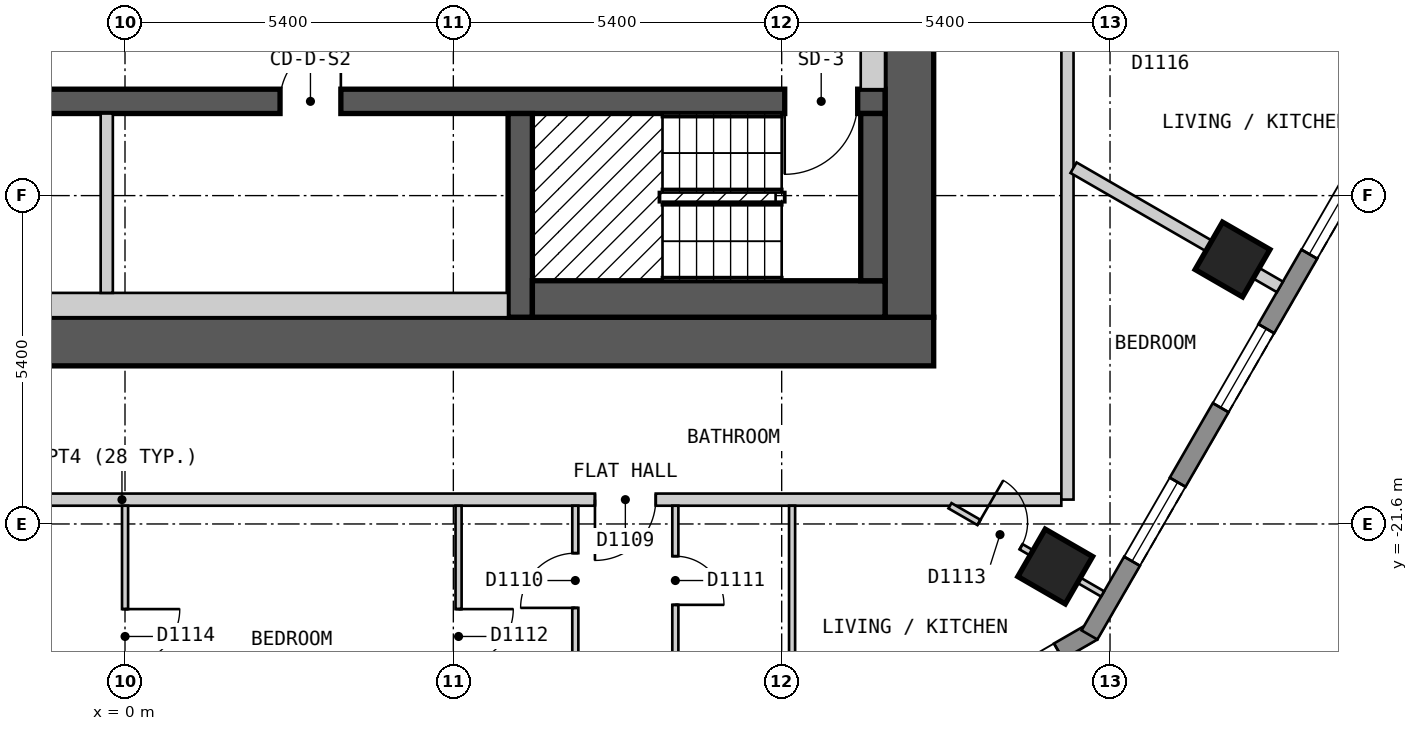
"""IFC4 building model, lengths in metres.
Left out: names, types, materials, properties, quantities, classifications, styles, units other than length and angle.
Written with IfcOpenShell. Run it as: python <this file> out.ifc"""

import sys

from ifc_helpers import new_model, si_unit, direction, frame, frame_2d, origin, origin_2d, place, context, subcontext, project, spatial, polyline, rectangle, outline, extrude, element, fill, save


model = new_model("IFC4")
c1 = context("Model", 3, precision=1e-05, world=origin(), true_north=direction((0.0, 1.0)))
c2 = subcontext(c1, "Body", "Model", "MODEL_VIEW")
j1 = project(units=[si_unit("LENGTHUNIT", "METRE"), si_unit("PLANEANGLEUNIT", "RADIAN")], contexts=[c1])
p1 = place(None, origin())
s1 = spatial("IfcSite", under=j1, at=p1, CompositionType="ELEMENT")
p2 = place(p1, origin())
s2 = spatial("IfcBuilding", under=s1, at=p2, CompositionType="ELEMENT")
p3 = place(p2, frame((0.0, 0.0, 144.6)))
s3 = spatial("IfcBuildingStorey", under=s2, at=p3, CompositionType="ELEMENT", Elevation=144.6)
for number, where, z_axis, x_axis in (
    (1, (15.299, -22.3, 0.0), (0.0, 0.0, 1.0), (0.5, 0.866, 0.0)),
    (2, (18.215, -17.251, 0.0), (0.0, 0.0, 1.0), (0.5, 0.866, 0.0)),
):
    element("IfcColumn", number, at=place(p3, frame(where, z_axis=z_axis, x_axis=x_axis)), inside=s3, PredefinedType="COLUMN", context=c2, shape_type="SweptSolid", body=[
        extrude(rectangle(XDim=0.9, YDim=0.9, at=origin_2d()), origin(), (0.0, 0.0, 1.0), 3.0),
    ])
p4 = place(p3, frame((-13.3, -18.6, 0.0), z_axis=(0.0, 0.0, 1.0), x_axis=(1.0, 0.0, 0.0)))
e3 = element("IfcWall", 3, at=p4, inside=s3, PredefinedType="SHEAR", context=c2, shape_type="SweptSolid", body=[
    extrude(rectangle(XDim=26.6, YDim=0.8, at=frame_2d((13.3, 0.0))), origin(), (0.0, 0.0, 1.0), 2.7),
])
p5 = place(p3, frame((12.9, -18.2, 0.0), z_axis=(0.0, 0.0, 1.0), x_axis=(0.0, 1.0, 0.0)))
e4 = element("IfcWall", 4, at=p5, inside=s3, PredefinedType="SHEAR", context=c2, shape_type="SweptSolid", body=[
    extrude(rectangle(XDim=12.4, YDim=0.8, at=frame_2d((6.2, 0.0))), origin(), (0.0, 0.0, 1.0), 2.7),
])
p6 = place(p3, frame((-12.5, -14.65, 0.0), z_axis=(0.0, 0.0, 1.0), x_axis=(1.0, 0.0, 0.0)))
e5 = element("IfcWall", 5, at=p6, inside=s3, PredefinedType="SHEAR", context=c2, shape_type="SweptSolid", body=[
    extrude(rectangle(XDim=25.0, YDim=0.4, at=frame_2d((12.5, 0.0))), origin(), (0.0, 0.0, 1.0), 2.7),
])
p7 = place(p6, frame((1.7, 0.0, 0.0), z_axis=(0.0, 0.0, 1.0), x_axis=(-1.0, 0.0, 0.0)))
e6 = element("IfcOpeningElement", 6, at=p7, cuts=e5, PredefinedType="OPENING", context=c2, shape_type="SweptSolid", body=[
    extrude(rectangle(XDim=1.2, YDim=2.1, at=frame_2d((0.6, 1.05))), frame((0.0, 0.21, 0.0), z_axis=(0.0, -1.0, 0.0), x_axis=(1.0, 0.0, 0.0)), (0.0, 0.0, 1.0), 0.42),
])
p8 = place(p6, frame((24.55, 0.0, 0.0), z_axis=(0.0, 0.0, 1.0), x_axis=(-1.0, 0.0, 0.0)))
e7 = element("IfcOpeningElement", 7, at=p8, cuts=e5, PredefinedType="OPENING", context=c2, shape_type="SweptSolid", body=[
    extrude(rectangle(XDim=1.2, YDim=2.1, at=frame_2d((0.6, 1.05))), frame((0.0, 0.21, 0.0), z_axis=(0.0, -1.0, 0.0), x_axis=(1.0, 0.0, 0.0)), (0.0, 0.0, 1.0), 0.42),
])
p9 = place(p6, frame((9.65, 0.0, 0.0), z_axis=(0.0, 0.0, 1.0), x_axis=(-1.0, 0.0, 0.0)))
e8 = element("IfcOpeningElement", 8, at=p9, cuts=e5, PredefinedType="OPENING", context=c2, shape_type="SweptSolid", body=[
    extrude(rectangle(XDim=1.0, YDim=2.1, at=frame_2d((0.5, 1.05))), frame((0.0, 0.21, 0.0), z_axis=(0.0, -1.0, 0.0), x_axis=(1.0, 0.0, 0.0)), (0.0, 0.0, 1.0), 0.42),
])
p10 = place(p6, frame((16.05, 0.0, 0.0), z_axis=(0.0, 0.0, 1.0), x_axis=(-1.0, 0.0, 0.0)))
e9 = element("IfcOpeningElement", 9, at=p10, cuts=e5, PredefinedType="OPENING", context=c2, shape_type="SweptSolid", body=[
    extrude(rectangle(XDim=1.0, YDim=2.1, at=frame_2d((0.5, 1.05))), frame((0.0, 0.21, 0.0), z_axis=(0.0, -1.0, 0.0), x_axis=(1.0, 0.0, 0.0)), (0.0, 0.0, 1.0), 0.42),
])
p11 = place(p3, frame((6.5, -18.2, 0.0), z_axis=(0.0, 0.0, 1.0), x_axis=(0.0, 1.0, 0.0)))
e10 = element("IfcWall", 10, at=p11, inside=s3, PredefinedType="SHEAR", context=c2, shape_type="SweptSolid", body=[
    extrude(rectangle(XDim=3.35, YDim=0.4, at=frame_2d((1.675, 0.0))), origin(), (0.0, 0.0, 1.0), 2.7),
])
p12 = place(p3, frame((11.587, -25.87, 0.0), z_axis=(0.0, 0.0, 1.0), x_axis=(0.866022959057, 0.500004234368, 0.0)))
e11 = element("IfcWall", 11, at=p12, inside=s3, PredefinedType="SOLIDWALL", context=c2, shape_type="SweptSolid", body=[
    extrude(outline(polyline([(0.0, -0.15), (5.0, -0.15), (4.92, 0.15), (0.08, 0.15), (0.0, -0.15)])), origin(), (0.0, 0.0, 1.0), 2.7),
])
p13 = place(p12, frame((0.65, 0.0, 0.15)))
e12 = element("IfcOpeningElement", 12, at=p13, cuts=e11, PredefinedType="OPENING", context=c2, shape_type="SweptSolid", body=[
    extrude(rectangle(XDim=1.2, YDim=2.1, at=frame_2d((0.6, 1.05))), frame((0.0, 0.16, 0.0), z_axis=(0.0, -1.0, 0.0), x_axis=(1.0, 0.0, 0.0)), (0.0, 0.0, 1.0), 0.32),
])
p14 = place(p12, frame((3.149, 0.0, 0.15)))
e13 = element("IfcOpeningElement", 13, at=p14, cuts=e11, PredefinedType="OPENING", context=c2, shape_type="SweptSolid", body=[
    extrude(rectangle(XDim=1.2, YDim=2.1, at=frame_2d((0.6, 1.05))), frame((0.0, 0.16, 0.0), z_axis=(0.0, -1.0, 0.0), x_axis=(1.0, 0.0, 0.0)), (0.0, 0.0, 1.0), 0.32),
])
p15 = place(p3, frame((15.862, -23.425, 0.0), z_axis=(0.0, 0.0, 1.0), x_axis=(0.500017503135, 0.866015298109, 0.0)))
e14 = element("IfcWall", 14, at=p15, inside=s3, PredefinedType="SOLIDWALL", context=c2, shape_type="SweptSolid", body=[
    extrude(outline(polyline([(0.0, -0.15), (24.711, -0.15), (24.631, 0.15), (0.08, 0.15), (0.0, -0.15)])), origin(), (0.0, 0.0, 1.0), 2.7),
])
p16 = place(p15, frame((1.4, 0.0, 0.15)))
e15 = element("IfcOpeningElement", 15, at=p16, cuts=e14, PredefinedType="OPENING", context=c2, shape_type="SweptSolid", body=[
    extrude(rectangle(XDim=1.5, YDim=2.1, at=frame_2d((0.75, 1.05))), frame((0.0, 0.16, 0.0), z_axis=(0.0, -1.0, 0.0), x_axis=(1.0, 0.0, 0.0)), (0.0, 0.0, 1.0), 0.32),
])
p17 = place(p15, frame((4.316, 0.0, 0.15)))
e16 = element("IfcOpeningElement", 16, at=p17, cuts=e14, PredefinedType="OPENING", context=c2, shape_type="SweptSolid", body=[
    extrude(rectangle(XDim=1.5, YDim=2.1, at=frame_2d((0.75, 1.05))), frame((0.0, 0.16, 0.0), z_axis=(0.0, -1.0, 0.0), x_axis=(1.0, 0.0, 0.0)), (0.0, 0.0, 1.0), 0.32),
])
p18 = place(p15, frame((7.231, 0.0, 0.15)))
e17 = element("IfcOpeningElement", 17, at=p18, cuts=e14, PredefinedType="OPENING", context=c2, shape_type="SweptSolid", body=[
    extrude(rectangle(XDim=1.5, YDim=2.1, at=frame_2d((0.75, 1.05))), frame((0.0, 0.16, 0.0), z_axis=(0.0, -1.0, 0.0), x_axis=(1.0, 0.0, 0.0)), (0.0, 0.0, 1.0), 0.32),
])
p19 = place(p15, frame((10.147, 0.0, 0.15)))
e18 = element("IfcOpeningElement", 18, at=p19, cuts=e14, PredefinedType="OPENING", context=c2, shape_type="SweptSolid", body=[
    extrude(rectangle(XDim=1.5, YDim=2.1, at=frame_2d((0.75, 1.05))), frame((0.0, 0.16, 0.0), z_axis=(0.0, -1.0, 0.0), x_axis=(1.0, 0.0, 0.0)), (0.0, 0.0, 1.0), 0.32),
])
p20 = place(p15, frame((13.062, 0.0, 0.15)))
e19 = element("IfcOpeningElement", 19, at=p20, cuts=e14, PredefinedType="OPENING", context=c2, shape_type="SweptSolid", body=[
    extrude(rectangle(XDim=1.5, YDim=2.1, at=frame_2d((0.75, 1.05))), frame((0.0, 0.16, 0.0), z_axis=(0.0, -1.0, 0.0), x_axis=(1.0, 0.0, 0.0)), (0.0, 0.0, 1.0), 0.32),
])
p21 = place(p15, frame((15.977, 0.0, 0.15)))
e20 = element("IfcOpeningElement", 20, at=p21, cuts=e14, PredefinedType="OPENING", context=c2, shape_type="SweptSolid", body=[
    extrude(rectangle(XDim=1.5, YDim=2.1, at=frame_2d((0.75, 1.05))), frame((0.0, 0.16, 0.0), z_axis=(0.0, -1.0, 0.0), x_axis=(1.0, 0.0, 0.0)), (0.0, 0.0, 1.0), 0.32),
])
p22 = place(p15, frame((18.893, 0.0, 0.15)))
e21 = element("IfcOpeningElement", 21, at=p22, cuts=e14, PredefinedType="OPENING", context=c2, shape_type="SweptSolid", body=[
    extrude(rectangle(XDim=1.5, YDim=2.1, at=frame_2d((0.75, 1.05))), frame((0.0, 0.16, 0.0), z_axis=(0.0, -1.0, 0.0), x_axis=(1.0, 0.0, 0.0)), (0.0, 0.0, 1.0), 0.32),
])
p23 = place(p15, frame((21.809, 0.0, 0.15)))
e22 = element("IfcOpeningElement", 22, at=p23, cuts=e14, PredefinedType="OPENING", context=c2, shape_type="SweptSolid", body=[
    extrude(rectangle(XDim=1.5, YDim=2.1, at=frame_2d((0.75, 1.05))), frame((0.0, 0.16, 0.0), z_axis=(0.0, -1.0, 0.0), x_axis=(1.0, 0.0, 0.0)), (0.0, 0.0, 1.0), 0.32),
])
p24 = place(p3, frame((-15.499, -21.2, 0.0), z_axis=(0.0, 0.0, 1.0), x_axis=(1.0, 0.0, 0.0)))
e23 = element("IfcWall", 23, at=p24, inside=s3, PredefinedType="PARTITIONING", context=c2, shape_type="SweptSolid", body=[
    extrude(rectangle(XDim=30.898, YDim=0.2, at=frame_2d((15.449, 0.0))), origin(), (0.0, 0.0, 1.0), 2.7),
])
p25 = place(p24, frame((6.773, 0.0, 0.0)))
e24 = element("IfcOpeningElement", 24, at=p25, cuts=e23, PredefinedType="OPENING", context=c2, shape_type="SweptSolid", body=[
    extrude(rectangle(XDim=1.0, YDim=2.1, at=frame_2d((0.5, 1.05))), frame((0.0, 0.11, 0.0), z_axis=(0.0, -1.0, 0.0), x_axis=(1.0, 0.0, 0.0)), (0.0, 0.0, 1.0), 0.22),
])
p26 = place(p24, frame((23.228, 0.0, 0.0)))
e25 = element("IfcOpeningElement", 25, at=p26, cuts=e23, PredefinedType="OPENING", context=c2, shape_type="SweptSolid", body=[
    extrude(rectangle(XDim=1.0, YDim=2.1, at=frame_2d((0.5, 1.05))), frame((0.0, 0.11, 0.0), z_axis=(0.0, -1.0, 0.0), x_axis=(1.0, 0.0, 0.0)), (0.0, 0.0, 1.0), 0.22),
])
p27 = place(p3, frame((15.5, -21.199, 0.0), z_axis=(0.0, 0.0, 1.0), x_axis=(0.0, 1.0, 0.0)))
e26 = element("IfcWall", 26, at=p27, inside=s3, PredefinedType="PARTITIONING", context=c2, shape_type="SweptSolid", body=[
    extrude(rectangle(XDim=12.147, YDim=0.2, at=frame_2d((6.073, 0.0))), origin(), (0.0, 0.0, 1.0), 2.7),
])
p28 = place(p27, frame((8.348, 0.0, 0.0)))
e27 = element("IfcOpeningElement", 27, at=p28, cuts=e26, PredefinedType="OPENING", context=c2, shape_type="SweptSolid", body=[
    extrude(rectangle(XDim=1.0, YDim=2.1, at=frame_2d((0.5, 1.05))), frame((0.0, 0.11, 0.0), z_axis=(0.0, -1.0, 0.0), x_axis=(1.0, 0.0, 0.0)), (0.0, 0.0, 1.0), 0.22),
])
p29 = place(p3, frame((7.406, -21.3, 0.0), z_axis=(0.0, 0.0, 1.0), x_axis=(0.0, -1.0, 0.0)))
e28 = element("IfcWall", 28, at=p29, inside=s3, PredefinedType="PARTITIONING", context=c2, shape_type="SweptSolid", body=[
    extrude(rectangle(XDim=2.509, YDim=0.1, at=frame_2d((1.254, 0.0))), origin(), (0.0, 0.0, 1.0), 2.7),
])
p30 = place(p29, frame((0.78, 0.0, 0.0)))
e29 = element("IfcOpeningElement", 29, at=p30, cuts=e28, PredefinedType="OPENING", context=c2, shape_type="SweptSolid", body=[
    extrude(rectangle(XDim=0.9, YDim=2.1, at=frame_2d((0.45, 1.05))), frame((0.0, 0.06, 0.0), z_axis=(0.0, -1.0, 0.0), x_axis=(1.0, 0.0, 0.0)), (0.0, 0.0, 1.0), 0.12),
])
p31 = place(p3, frame((13.568, -21.3, 0.0), z_axis=(0.0, 0.0, 1.0), x_axis=(0.865885342641, -0.500242514586, 0.0)))
e30 = element("IfcWall", 30, at=p31, inside=s3, PredefinedType="PARTITIONING", context=c2, shape_type="SweptSolid", body=[
    extrude(rectangle(XDim=2.898, YDim=0.1, at=frame_2d((1.449, 0.0))), origin(), (0.0, 0.0, 1.0), 2.7),
])
p32 = place(p31, frame((0.55, 0.0, 0.0)))
e31 = element("IfcOpeningElement", 31, at=p32, cuts=e30, PredefinedType="OPENING", context=c2, shape_type="SweptSolid", body=[
    extrude(rectangle(XDim=0.8, YDim=2.1, at=frame_2d((0.4, 1.05))), frame((0.0, 0.06, 0.0), z_axis=(0.0, -1.0, 0.0), x_axis=(1.0, 0.0, 0.0)), (0.0, 0.0, 1.0), 0.12),
])
p33 = place(p3, frame((5.486, -25.7, 0.0), z_axis=(0.0, 0.0, 1.0), x_axis=(0.0, 1.0, 0.0)))
e32 = element("IfcWall", 32, at=p33, inside=s3, PredefinedType="PARTITIONING", context=c2, shape_type="SweptSolid", body=[
    extrude(rectangle(XDim=4.4, YDim=0.1, at=frame_2d((2.2, 0.0))), origin(), (0.0, 0.0, 1.0), 2.7),
])
p34 = place(p33, frame((1.8, 0.0, 0.0)))
e33 = element("IfcOpeningElement", 33, at=p34, cuts=e32, PredefinedType="OPENING", context=c2, shape_type="SweptSolid", body=[
    extrude(rectangle(XDim=0.9, YDim=2.1, at=frame_2d((0.45, 1.05))), frame((0.0, 0.06, 0.0), z_axis=(0.0, -1.0, 0.0), x_axis=(1.0, 0.0, 0.0)), (0.0, 0.0, 1.0), 0.12),
])
p35 = place(p3, frame((9.051, -23.81, 0.0), z_axis=(0.0, 0.0, 1.0), x_axis=(0.0, 1.0, 0.0)))
e34 = element("IfcWall", 34, at=p35, inside=s3, PredefinedType="PARTITIONING", context=c2, shape_type="SweptSolid", body=[
    extrude(rectangle(XDim=2.51, YDim=0.1, at=frame_2d((1.255, 0.0))), origin(), (0.0, 0.0, 1.0), 2.7),
])
p36 = place(p35, frame((0.88, 0.0, 0.0)))
e35 = element("IfcOpeningElement", 35, at=p36, cuts=e34, PredefinedType="OPENING", context=c2, shape_type="SweptSolid", body=[
    extrude(rectangle(XDim=0.8, YDim=2.1, at=frame_2d((0.4, 1.05))), frame((0.0, 0.06, 0.0), z_axis=(0.0, -1.0, 0.0), x_axis=(1.0, 0.0, 0.0)), (0.0, 0.0, 1.0), 0.12),
])
p37 = place(p3, frame((10.971, -23.859, 0.0), z_axis=(0.0, 0.0, 1.0), x_axis=(0.0, 1.0, 0.0)))
e36 = element("IfcWall", 36, at=p37, inside=s3, PredefinedType="PARTITIONING", context=c2, shape_type="SweptSolid", body=[
    extrude(rectangle(XDim=2.559, YDim=0.1, at=frame_2d((1.279, 0.0))), origin(), (0.0, 0.0, 1.0), 2.7),
])
p38 = place(p3, frame((0.001, -25.7, 0.0), z_axis=(0.0, 0.0, 1.0), x_axis=(0.0, 1.0, 0.0)))
e37 = element("IfcWall", 37, at=p38, inside=s3, PredefinedType="PARTITIONING", context=c2, shape_type="SweptSolid", body=[
    extrude(rectangle(XDim=4.4, YDim=0.1, at=frame_2d((2.2, 0.0))), origin(), (0.0, 0.0, 1.0), 2.7),
])
p39 = place(p38, frame((1.8, 0.0, 0.0)))
e38 = element("IfcOpeningElement", 38, at=p39, cuts=e37, PredefinedType="OPENING", context=c2, shape_type="SweptSolid", body=[
    extrude(rectangle(XDim=0.9, YDim=2.1, at=frame_2d((0.45, 1.05))), frame((0.0, 0.06, 0.0), z_axis=(0.0, -1.0, 0.0), x_axis=(1.0, 0.0, 0.0)), (0.0, 0.0, 1.0), 0.12),
])
p40 = place(p3, frame((15.6, -15.741, 0.0), z_axis=(0.0, 0.0, 1.0), x_axis=(0.865964599155, -0.500105301922, 0.0)))
e39 = element("IfcWall", 39, at=p40, inside=s3, PredefinedType="PARTITIONING", context=c2, shape_type="SweptSolid", body=[
    extrude(rectangle(XDim=3.919, YDim=0.2, at=frame_2d((1.959, 0.0))), origin(), (0.0, 0.0, 1.0), 2.7),
])
p41 = place(p3, frame((-6.3, -18.0, 0.0), z_axis=(0.0, 0.0, 1.0), x_axis=(1.0, 0.0, 0.0)))
e40 = element("IfcWall", 40, at=p41, inside=s3, PredefinedType="PARTITIONING", context=c2, shape_type="SweptSolid", body=[
    extrude(rectangle(XDim=12.6, YDim=0.4, at=frame_2d((6.3, 0.0))), origin(), (0.0, 0.0, 1.0), 2.7),
])
p42 = place(p3, frame((-0.3, -17.8, 0.0), z_axis=(0.0, 0.0, 1.0), x_axis=(0.0, 1.0, 0.0)))
e41 = element("IfcWall", 41, at=p42, inside=s3, PredefinedType="PARTITIONING", context=c2, shape_type="SweptSolid", body=[
    extrude(rectangle(XDim=2.95, YDim=0.2, at=frame_2d((1.475, 0.0))), origin(), (0.0, 0.0, 1.0), 2.7),
])
p43 = place(p3, frame((6.7, -17.9, 0.0), z_axis=(0.0, 0.0, 1.0), x_axis=(1.0, 0.0, 0.0)))
e42 = element("IfcWall", 42, at=p43, inside=s3, PredefinedType="SOLIDWALL", context=c2, shape_type="SweptSolid", body=[
    extrude(rectangle(XDim=5.8, YDim=0.6, at=frame_2d((2.9, 0.0))), origin(), (0.0, 0.0, 1.0), 2.7),
])
p44 = place(p3, frame((12.3, -17.6, 0.0), z_axis=(0.0, 0.0, 1.0), x_axis=(0.0, 1.0, 0.0)))
e43 = element("IfcWall", 43, at=p44, inside=s3, PredefinedType="SOLIDWALL", context=c2, shape_type="SweptSolid", body=[
    extrude(rectangle(XDim=2.75, YDim=0.4, at=frame_2d((1.375, 0.0))), origin(), (0.0, 0.0, 1.0), 2.7),
])
p45 = place(p3, frame((12.3, -14.45, 0.0), z_axis=(0.0, 0.0, 1.0), x_axis=(0.0, 1.0, 0.0)))
e44 = element("IfcWall", 44, at=p45, inside=s3, PredefinedType="PARTITIONING", context=c2, shape_type="SweptSolid", body=[
    extrude(rectangle(XDim=8.25, YDim=0.4, at=frame_2d((4.125, 0.0))), origin(), (0.0, 0.0, 1.0), 2.7),
])
p46 = place(p14, origin())
e45 = element("IfcWindow", 45, at=p46, inside=s3, PartitioningType="SINGLE_PANEL", PredefinedType="WINDOW", context=c2, shape_type="SweptSolid", body=[
    extrude(rectangle(XDim=1.2, YDim=2.1, at=frame_2d((0.6, 1.05))), frame((0.0, 0.03, 0.0), z_axis=(0.0, -1.0, 0.0), x_axis=(1.0, 0.0, 0.0)), (0.0, 0.0, 1.0), 0.06),
])
fill(e13, e45)
p47 = place(p16, origin())
e46 = element("IfcWindow", 46, at=p47, inside=s3, PartitioningType="SINGLE_PANEL", PredefinedType="WINDOW", context=c2, shape_type="SweptSolid", body=[
    extrude(rectangle(XDim=1.5, YDim=2.1, at=frame_2d((0.75, 1.05))), frame((0.0, 0.03, 0.0), z_axis=(0.0, -1.0, 0.0), x_axis=(1.0, 0.0, 0.0)), (0.0, 0.0, 1.0), 0.06),
])
fill(e15, e46)
p48 = place(p17, origin())
e47 = element("IfcWindow", 47, at=p48, inside=s3, PartitioningType="SINGLE_PANEL", PredefinedType="WINDOW", context=c2, shape_type="SweptSolid", body=[
    extrude(rectangle(XDim=1.5, YDim=2.1, at=frame_2d((0.75, 1.05))), frame((0.0, 0.03, 0.0), z_axis=(0.0, -1.0, 0.0), x_axis=(1.0, 0.0, 0.0)), (0.0, 0.0, 1.0), 0.06),
])
fill(e16, e47)
p49 = place(p18, origin())
e48 = element("IfcWindow", 48, at=p49, inside=s3, PartitioningType="SINGLE_PANEL", PredefinedType="WINDOW", context=c2, shape_type="SweptSolid", body=[
    extrude(rectangle(XDim=1.5, YDim=2.1, at=frame_2d((0.75, 1.05))), frame((0.0, 0.03, 0.0), z_axis=(0.0, -1.0, 0.0), x_axis=(1.0, 0.0, 0.0)), (0.0, 0.0, 1.0), 0.06),
])
fill(e17, e48)
p50 = place(p26, origin())
e49 = element("IfcDoor", 49, at=p50, inside=s3, OperationType="SINGLE_SWING_LEFT", PredefinedType="DOOR", context=c2, shape_type="SweptSolid", body=[
    extrude(rectangle(XDim=1.0, YDim=2.1, at=frame_2d((0.5, 1.05))), frame((0.0, 0.025, 0.0), z_axis=(0.0, -1.0, 0.0), x_axis=(1.0, 0.0, 0.0)), (0.0, 0.0, 1.0), 0.05),
])
fill(e25, e49)
p51 = place(p30, origin())
e50 = element("IfcDoor", 50, at=p51, inside=s3, OperationType="SINGLE_SWING_RIGHT", PredefinedType="DOOR", context=c2, shape_type="SweptSolid", body=[
    extrude(rectangle(XDim=0.9, YDim=2.1, at=frame_2d((0.45, 1.05))), frame((0.0, 0.025, 0.0), z_axis=(0.0, -1.0, 0.0), x_axis=(1.0, 0.0, 0.0)), (0.0, 0.0, 1.0), 0.05),
])
fill(e29, e50)
p52 = place(p36, origin())
e51 = element("IfcDoor", 51, at=p52, inside=s3, OperationType="SINGLE_SWING_LEFT", PredefinedType="DOOR", context=c2, shape_type="SweptSolid", body=[
    extrude(rectangle(XDim=0.8, YDim=2.1, at=frame_2d((0.4, 1.05))), frame((0.0, 0.025, 0.0), z_axis=(0.0, -1.0, 0.0), x_axis=(1.0, 0.0, 0.0)), (0.0, 0.0, 1.0), 0.05),
])
fill(e35, e51)
p53 = place(p34, origin())
e52 = element("IfcDoor", 52, at=p53, inside=s3, OperationType="SINGLE_SWING_RIGHT", PredefinedType="DOOR", context=c2, shape_type="SweptSolid", body=[
    extrude(rectangle(XDim=0.9, YDim=2.1, at=frame_2d((0.45, 1.05))), frame((0.0, 0.025, 0.0), z_axis=(0.0, -1.0, 0.0), x_axis=(1.0, 0.0, 0.0)), (0.0, 0.0, 1.0), 0.05),
])
fill(e33, e52)
p54 = place(p32, origin())
e53 = element("IfcDoor", 53, at=p54, inside=s3, OperationType="SINGLE_SWING_LEFT", PredefinedType="DOOR", context=c2, shape_type="SweptSolid", body=[
    extrude(rectangle(XDim=0.8, YDim=2.1, at=frame_2d((0.4, 1.05))), frame((0.0, 0.025, 0.0), z_axis=(0.0, -1.0, 0.0), x_axis=(1.0, 0.0, 0.0)), (0.0, 0.0, 1.0), 0.05),
])
fill(e31, e53)
p55 = place(p39, origin())
e54 = element("IfcDoor", 54, at=p55, inside=s3, OperationType="SINGLE_SWING_RIGHT", PredefinedType="DOOR", context=c2, shape_type="SweptSolid", body=[
    extrude(rectangle(XDim=0.9, YDim=2.1, at=frame_2d((0.45, 1.05))), frame((0.0, 0.025, 0.0), z_axis=(0.0, -1.0, 0.0), x_axis=(1.0, 0.0, 0.0)), (0.0, 0.0, 1.0), 0.05),
])
fill(e38, e54)
p56 = place(p8, origin())
e55 = element("IfcDoor", 55, at=p56, inside=s3, OperationType="SINGLE_SWING_RIGHT", PredefinedType="DOOR", context=c2, shape_type="SweptSolid", body=[
    extrude(rectangle(XDim=1.2, YDim=2.1, at=frame_2d((0.6, 1.05))), frame((0.0, 0.025, 0.0), z_axis=(0.0, -1.0, 0.0), x_axis=(1.0, 0.0, 0.0)), (0.0, 0.0, 1.0), 0.05),
])
fill(e7, e55)
p57 = place(p10, origin())
e56 = element("IfcDoor", 56, at=p57, inside=s3, OperationType="SINGLE_SWING_LEFT", PredefinedType="DOOR", context=c2, shape_type="SweptSolid", body=[
    extrude(rectangle(XDim=1.0, YDim=2.1, at=frame_2d((0.5, 1.05))), frame((0.0, 0.025, 0.0), z_axis=(0.0, -1.0, 0.0), x_axis=(1.0, 0.0, 0.0)), (0.0, 0.0, 1.0), 0.05),
])
fill(e9, e56)
save(model, sys.argv[1])
